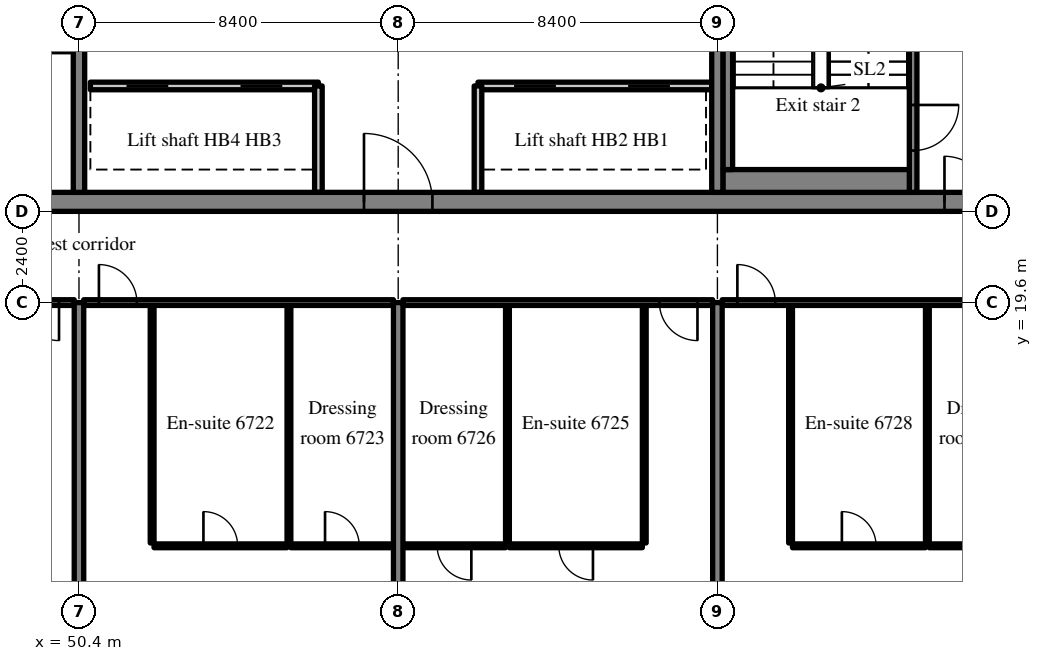
"""IFC4 building model, lengths in metres.
Left out: names, types, materials, properties, quantities, classifications, styles, units other than length and angle.
Written with IfcOpenShell. Run it as: python <this file> out.ifc"""

import sys

from ifc_helpers import new_model, si_unit, direction, frame, frame_2d, origin, place, context, subcontext, project, spatial, rectangle, extrude, source, transform, mapped, element, fill, save


model = new_model("IFC4")
c1 = context("Model", 3, precision=1e-05, world=origin(), true_north=direction((0.0, 1.0)))
c2 = subcontext(c1, "Body", "Model", "MODEL_VIEW")
j1 = project(units=[si_unit("LENGTHUNIT", "METRE"), si_unit("PLANEANGLEUNIT", "RADIAN")], contexts=[c1])
p1 = place(None, origin())
s1 = spatial("IfcSite", under=j1, at=p1, CompositionType="ELEMENT")
p2 = place(p1, origin())
s2 = spatial("IfcBuilding", under=s1, at=p2, CompositionType="ELEMENT")
p3 = place(p2, frame((0.0, 0.0, 281.7)))
s3 = spatial("IfcBuildingStorey", under=s2, at=p3, CompositionType="ELEMENT", Elevation=281.7)
m1 = source(origin(), c2, "Body", "SweptSolid", [
    extrude(rectangle(XDim=50.4, YDim=0.5, at=frame_2d((25.2, 0.0))), origin(), (0.0, 0.0, 1.0), 3.72),
])
p4 = place(p3, frame((25.2, 22.25, 0.0), z_axis=(0.0, 0.0, 1.0), x_axis=(1.0, 0.0, 0.0)))
e1 = element("IfcWall", 1, at=p4, inside=s3, PredefinedType="SHEAR", context=c2, shape_type="MappedRepresentation", body=[
    mapped(m1, transform((0.0, 0.0, 0.0), scale=1.0)),
])
m2 = source(origin(), c2, "Body", "SweptSolid", [
    extrude(rectangle(XDim=1.8, YDim=2.1, at=frame_2d((0.9, 1.05))), frame((0.0, 0.26, 0.0), z_axis=(0.0, -1.0, 0.0), x_axis=(1.0, 0.0, 0.0)), (0.0, 0.0, 1.0), 0.52),
])
p5 = place(p4, frame((15.9, 0.0, 0.0)))
e2 = element("IfcOpeningElement", 2, at=p5, cuts=e1, PredefinedType="OPENING", context=c2, shape_type="MappedRepresentation", body=[
    mapped(m2, transform((0.0, 0.0, 0.0), scale=1.0)),
])
m3 = source(origin(), c2, "Body", "SweptSolid", [
    extrude(rectangle(XDim=0.9, YDim=2.1, at=frame_2d((0.45, 1.05))), frame((0.0, 0.26, 0.0), z_axis=(0.0, -1.0, 0.0), x_axis=(1.0, 0.0, 0.0)), (0.0, 0.0, 1.0), 0.52),
])
p6 = place(p4, frame((21.525, 0.0, 0.0)))
e3 = element("IfcOpeningElement", 3, at=p6, cuts=e1, PredefinedType="OPENING", context=c2, shape_type="MappedRepresentation", body=[
    mapped(m3, transform((0.0, 0.0, 0.0), scale=1.0)),
])
p7 = place(p4, frame((32.7, 0.0, 0.0)))
e4 = element("IfcOpeningElement", 4, at=p7, cuts=e1, PredefinedType="OPENING", context=c2, shape_type="MappedRepresentation", body=[
    mapped(m2, transform((0.0, 0.0, 0.0), scale=1.0)),
])
m4 = source(origin(), c2, "Body", "SweptSolid", [
    extrude(rectangle(XDim=1.2, YDim=2.1, at=frame_2d((0.6, 1.05))), frame((0.0, 0.26, 0.0), z_axis=(0.0, -1.0, 0.0), x_axis=(1.0, 0.0, 0.0)), (0.0, 0.0, 1.0), 0.52),
])
p8 = place(p4, frame((6.5, 0.0, 0.0)))
e5 = element("IfcOpeningElement", 5, at=p8, cuts=e1, PredefinedType="OPENING", context=c2, shape_type="MappedRepresentation", body=[
    mapped(m4, transform((0.0, 0.0, 0.0), scale=1.0)),
])
p9 = place(p4, frame((47.975, 0.0, 0.0)))
e6 = element("IfcOpeningElement", 6, at=p9, cuts=e1, PredefinedType="OPENING", context=c2, shape_type="MappedRepresentation", body=[
    mapped(m4, transform((0.0, 0.0, 0.0), scale=1.0)),
])
m5 = source(origin(), c2, "Body", "SweptSolid", [
    extrude(rectangle(XDim=19.0, YDim=0.3, at=frame_2d((9.5, 0.0))), origin(), (0.0, 0.0, 1.0), 3.72),
])
p10 = place(p3, frame((50.4, 22.5, 0.0), z_axis=(0.0, 0.0, 1.0), x_axis=(0.0, 1.0, 0.0)))
e7 = element("IfcWall", 7, at=p10, inside=s3, PredefinedType="SHEAR", context=c2, shape_type="MappedRepresentation", body=[
    mapped(m5, transform((0.0, 0.0, 0.0), scale=1.0)),
])
m6 = source(origin(), c2, "Body", "SweptSolid", [
    extrude(rectangle(XDim=1.1, YDim=2.1, at=frame_2d((0.55, 1.05))), frame((0.0, 0.16, 0.0), z_axis=(0.0, -1.0, 0.0), x_axis=(1.0, 0.0, 0.0)), (0.0, 0.0, 1.0), 0.32),
])
p11 = place(p10, frame((12.95, 0.0, 0.0)))
e8 = element("IfcOpeningElement", 8, at=p11, cuts=e7, PredefinedType="OPENING", context=c2, shape_type="MappedRepresentation", body=[
    mapped(m6, transform((0.0, 0.0, 0.0), scale=1.0)),
])
p12 = place(p3, frame((67.2, 22.5, 0.0), z_axis=(0.0, 0.0, 1.0), x_axis=(0.0, 1.0, 0.0)))
e9 = element("IfcWall", 9, at=p12, inside=s3, PredefinedType="SHEAR", context=c2, shape_type="MappedRepresentation", body=[
    mapped(m5, transform((0.0, 0.0, 0.0), scale=1.0)),
])
m7 = source(origin(), c2, "Body", "SweptSolid", [
    extrude(rectangle(XDim=13.1, YDim=0.25, at=frame_2d((6.55, 0.0))), origin(), (0.0, 0.0, 1.0), 3.72),
])
p13 = place(p3, frame((50.4, 6.5, 0.0), z_axis=(0.0, 0.0, 1.0), x_axis=(0.0, 1.0, 0.0)))
e10 = element("IfcWall", 10, at=p13, inside=s3, PredefinedType="SHEAR", context=c2, shape_type="MappedRepresentation", body=[
    mapped(m7, transform((0.0, 0.0, 0.0), scale=1.0)),
])
m8 = source(origin(), c2, "Body", "SweptSolid", [
    extrude(rectangle(XDim=14.1, YDim=0.25, at=frame_2d((7.05, 0.0))), origin(), (0.0, 0.0, 1.0), 3.72),
])
for number, where, z_axis, x_axis in (
    (11, (58.8, 5.5, 0.0), (0.0, 0.0, 1.0), (0.0, 1.0, 0.0)),
    (12, (67.2, 5.5, 0.0), (0.0, 0.0, 1.0), (0.0, 1.0, 0.0)),
):
    element("IfcWall", number, at=place(p3, frame(where, z_axis=z_axis, x_axis=x_axis)), inside=s3, PredefinedType="SHEAR", context=c2, shape_type="MappedRepresentation", body=[
        mapped(m8, transform((0.0, 0.0, 0.0), scale=1.0)),
    ])
m9 = source(origin(), c2, "Body", "SweptSolid", [
    extrude(rectangle(XDim=6.15, YDim=0.2, at=frame_2d((3.075, 0.0))), origin(), (0.0, 0.0, 1.0), 3.72),
])
p14 = place(p3, frame((67.05, 25.3, 0.0), z_axis=(0.0, 0.0, 1.0), x_axis=(-1.0, 0.0, 0.0)))
e13 = element("IfcWall", 13, at=p14, inside=s3, PredefinedType="SOLIDWALL", context=c2, shape_type="MappedRepresentation", body=[
    mapped(m9, transform((0.0, 0.0, 0.0), scale=1.0)),
])
m10 = source(origin(), c2, "Body", "SweptSolid", [
    extrude(rectangle(XDim=1.1, YDim=2.1, at=frame_2d((0.55, 1.05))), frame((0.0, 0.11, 0.0), z_axis=(0.0, -1.0, 0.0), x_axis=(1.0, 0.0, 0.0)), (0.0, 0.0, 1.0), 0.22),
])
p15 = place(p14, frame((1.1, 0.0, 0.0)))
e14 = element("IfcOpeningElement", 14, at=p15, cuts=e13, PredefinedType="OPENING", context=c2, shape_type="MappedRepresentation", body=[
    mapped(m10, transform((0.0, 0.0, 0.0), scale=1.0)),
])
p16 = place(p14, frame((4.1, 0.0, 0.0)))
e15 = element("IfcOpeningElement", 15, at=p16, cuts=e13, PredefinedType="OPENING", context=c2, shape_type="MappedRepresentation", body=[
    mapped(m10, transform((0.0, 0.0, 0.0), scale=1.0)),
])
m11 = source(origin(), c2, "Body", "SweptSolid", [
    extrude(rectangle(XDim=6.0, YDim=0.2, at=frame_2d((3.0, 0.0))), origin(), (0.0, 0.0, 1.0), 3.72),
])
p17 = place(p3, frame((56.7, 25.3, 0.0), z_axis=(0.0, 0.0, 1.0), x_axis=(-1.0, 0.0, 0.0)))
e16 = element("IfcWall", 16, at=p17, inside=s3, PredefinedType="SOLIDWALL", context=c2, shape_type="MappedRepresentation", body=[
    mapped(m11, transform((0.0, 0.0, 0.0), scale=1.0)),
])
p18 = place(p17, frame((0.95, 0.0, 0.0)))
e17 = element("IfcOpeningElement", 17, at=p18, cuts=e16, PredefinedType="OPENING", context=c2, shape_type="MappedRepresentation", body=[
    mapped(m10, transform((0.0, 0.0, 0.0), scale=1.0)),
])
p19 = place(p17, frame((3.95, 0.0, 0.0)))
e18 = element("IfcOpeningElement", 18, at=p19, cuts=e16, PredefinedType="OPENING", context=c2, shape_type="MappedRepresentation", body=[
    mapped(m10, transform((0.0, 0.0, 0.0), scale=1.0)),
])
m12 = source(origin(), c2, "Body", "SweptSolid", [
    extrude(rectangle(XDim=2.8, YDim=0.2, at=frame_2d((1.4, 0.0))), origin(), (0.0, 0.0, 1.0), 3.72),
])
for number, where, z_axis, x_axis in (
    (19, (60.9, 22.5, 0.0), (0.0, 0.0, 1.0), (0.0, 1.0, 0.0)),
    (20, (56.7, 22.5, 0.0), (0.0, 0.0, 1.0), (0.0, 1.0, 0.0)),
):
    element("IfcWall", number, at=place(p3, frame(where, z_axis=z_axis, x_axis=x_axis)), inside=s3, PredefinedType="SOLIDWALL", context=c2, shape_type="MappedRepresentation", body=[
        mapped(m12, transform((0.0, 0.0, 0.0), scale=1.0)),
    ])
m13 = source(origin(), c2, "Body", "SweptSolid", [
    extrude(rectangle(XDim=8.95, YDim=0.2, at=frame_2d((4.475, 0.0))), origin(), (0.0, 0.0, 1.0), 3.72),
])
p20 = place(p3, frame((72.35, 22.5, 0.0), z_axis=(0.0, 0.0, 1.0), x_axis=(0.0, 1.0, 0.0)))
e21 = element("IfcWall", 21, at=p20, inside=s3, PredefinedType="SOLIDWALL", context=c2, shape_type="MappedRepresentation", body=[
    mapped(m13, transform((0.0, 0.0, 0.0), scale=1.0)),
])
m14 = source(origin(), c2, "Body", "SweptSolid", [
    extrude(rectangle(XDim=1.2, YDim=2.1, at=frame_2d((0.6, 1.05))), frame((0.0, 0.11, 0.0), z_axis=(0.0, -1.0, 0.0), x_axis=(1.0, 0.0, 0.0)), (0.0, 0.0, 1.0), 0.22),
])
p21 = place(p20, frame((1.1, 0.0, 0.0)))
e22 = element("IfcOpeningElement", 22, at=p21, cuts=e21, PredefinedType="OPENING", context=c2, shape_type="MappedRepresentation", body=[
    mapped(m14, transform((0.0, 0.0, 0.0), scale=1.0)),
])
m15 = source(origin(), c2, "Body", "SweptSolid", [
    extrude(rectangle(XDim=4.9, YDim=0.6, at=frame_2d((2.45, 0.0))), origin(), (0.0, 0.0, 1.0), 3.72),
])
p22 = place(p3, frame((67.35, 22.8, 0.0), z_axis=(0.0, 0.0, 1.0), x_axis=(1.0, 0.0, 0.0)))
e23 = element("IfcWall", 23, at=p22, inside=s3, PredefinedType="SOLIDWALL", context=c2, shape_type="MappedRepresentation", body=[
    mapped(m15, transform((0.0, 0.0, 0.0), scale=1.0)),
])
m16 = source(origin(), c2, "Body", "SweptSolid", [
    extrude(rectangle(XDim=8.1, YDim=0.25, at=frame_2d((4.05, 0.0))), origin(), (0.0, 0.0, 1.0), 3.72),
])
p23 = place(p3, frame((67.475, 23.1, 0.0), z_axis=(0.0, 0.0, 1.0), x_axis=(0.0, 1.0, 0.0)))
e24 = element("IfcWall", 24, at=p23, inside=s3, PredefinedType="SOLIDWALL", context=c2, shape_type="MappedRepresentation", body=[
    mapped(m16, transform((0.0, 0.0, 0.0), scale=1.0)),
])
m17 = source(origin(), c2, "Body", "SweptSolid", [
    extrude(rectangle(XDim=8.15, YDim=0.15, at=frame_2d((4.075, 0.0))), origin(), (0.0, 0.0, 1.0), 3.02),
])
p24 = place(p3, frame((42.125, 19.6, 0.0), z_axis=(0.0, 0.0, 1.0), x_axis=(1.0, 0.0, 0.0)))
e25 = element("IfcWall", 25, at=p24, inside=s3, PredefinedType="PARTITIONING", context=c2, shape_type="MappedRepresentation", body=[
    mapped(m17, transform((0.0, 0.0, 0.0), scale=1.0)),
])
m18 = source(origin(), c2, "Body", "SweptSolid", [
    extrude(rectangle(XDim=1.0, YDim=2.1, at=frame_2d((0.5, 1.05))), frame((0.0, 0.085, 0.0), z_axis=(0.0, -1.0, 0.0), x_axis=(1.0, 0.0, 0.0)), (0.0, 0.0, 1.0), 0.17),
])
p25 = place(p24, frame((6.75, 0.0, 0.0)))
e26 = element("IfcOpeningElement", 26, at=p25, cuts=e25, PredefinedType="OPENING", context=c2, shape_type="MappedRepresentation", body=[
    mapped(m18, transform((0.0, 0.0, 0.0), scale=1.0)),
])
m19 = source(origin(), c2, "Body", "SweptSolid", [
    extrude(rectangle(XDim=6.25, YDim=0.1, at=frame_2d((3.125, 0.0))), origin(), (0.0, 0.0, 1.0), 3.72),
])
for number, where, z_axis, x_axis in (
    (27, (52.325, 13.275, 0.0), (0.0, 0.0, 1.0), (0.0, 1.0, 0.0)),
    (28, (55.925, 13.275, 0.0), (0.0, 0.0, 1.0), (0.0, 1.0, 0.0)),
):
    element("IfcWall", number, at=place(p3, frame(where, z_axis=z_axis, x_axis=x_axis)), inside=s3, PredefinedType="PARTITIONING", context=c2, shape_type="MappedRepresentation", body=[
        mapped(m19, transform((0.0, 0.0, 0.0), scale=1.0)),
    ])
m20 = source(origin(), c2, "Body", "SweptSolid", [
    extrude(rectangle(XDim=3.5, YDim=0.1, at=frame_2d((1.75, 0.0))), origin(), (0.0, 0.0, 1.0), 3.72),
])
p26 = place(p3, frame((52.375, 13.2, 0.0), z_axis=(0.0, 0.0, 1.0), x_axis=(1.0, 0.0, 0.0)))
e29 = element("IfcWall", 29, at=p26, inside=s3, PredefinedType="PARTITIONING", context=c2, shape_type="MappedRepresentation", body=[
    mapped(m20, transform((0.0, 0.0, 0.0), scale=1.0)),
])
m21 = source(origin(), c2, "Body", "SweptSolid", [
    extrude(rectangle(XDim=0.9, YDim=2.1, at=frame_2d((0.45, 1.05))), frame((0.0, 0.06, 0.0), z_axis=(0.0, -1.0, 0.0), x_axis=(1.0, 0.0, 0.0)), (0.0, 0.0, 1.0), 0.12),
])
p27 = place(p26, frame((1.3, 0.0, 0.0)))
e30 = element("IfcOpeningElement", 30, at=p27, cuts=e29, PredefinedType="OPENING", context=c2, shape_type="MappedRepresentation", body=[
    mapped(m21, transform((0.0, 0.0, 0.0), scale=1.0)),
])
m22 = source(origin(), c2, "Body", "SweptSolid", [
    extrude(rectangle(XDim=2.7, YDim=0.1, at=frame_2d((1.35, 0.0))), origin(), (0.0, 0.0, 1.0), 3.72),
])
p28 = place(p3, frame((55.975, 13.2, 0.0), z_axis=(0.0, 0.0, 1.0), x_axis=(1.0, 0.0, 0.0)))
e31 = element("IfcWall", 31, at=p28, inside=s3, PredefinedType="PARTITIONING", context=c2, shape_type="MappedRepresentation", body=[
    mapped(m22, transform((0.0, 0.0, 0.0), scale=1.0)),
])
p29 = place(p28, frame((0.9, 0.0, 0.0)))
e32 = element("IfcOpeningElement", 32, at=p29, cuts=e31, PredefinedType="OPENING", context=c2, shape_type="MappedRepresentation", body=[
    mapped(m21, transform((0.0, 0.0, 0.0), scale=1.0)),
])
m23 = source(origin(), c2, "Body", "SweptSolid", [
    extrude(rectangle(XDim=8.15, YDim=0.15, at=frame_2d((4.075, 0.0))), origin(), (0.0, 0.0, 1.0), 3.02),
])
p30 = place(p3, frame((50.525, 19.6, 0.0), z_axis=(0.0, 0.0, 1.0), x_axis=(1.0, 0.0, 0.0)))
e33 = element("IfcWall", 33, at=p30, inside=s3, PredefinedType="PARTITIONING", context=c2, shape_type="MappedRepresentation", body=[
    mapped(m23, transform((0.0, 0.0, 0.0), scale=1.0)),
])
p31 = place(p30, frame((0.4, 0.0, 0.0)))
e34 = element("IfcOpeningElement", 34, at=p31, cuts=e33, PredefinedType="OPENING", context=c2, shape_type="MappedRepresentation", body=[
    mapped(m18, transform((0.0, 0.0, 0.0), scale=1.0)),
])
for number, where, z_axis, x_axis in (
    (35, (65.275, 13.275, 0.0), (0.0, 0.0, 1.0), (0.0, 1.0, 0.0)),
    (36, (61.675, 13.275, 0.0), (0.0, 0.0, 1.0), (0.0, 1.0, 0.0)),
):
    element("IfcWall", number, at=place(p3, frame(where, z_axis=z_axis, x_axis=x_axis)), inside=s3, PredefinedType="PARTITIONING", context=c2, shape_type="MappedRepresentation", body=[
        mapped(m19, transform((0.0, 0.0, 0.0), scale=1.0)),
    ])
p32 = place(p3, frame((61.725, 13.2, 0.0), z_axis=(0.0, 0.0, 1.0), x_axis=(1.0, 0.0, 0.0)))
e37 = element("IfcWall", 37, at=p32, inside=s3, PredefinedType="PARTITIONING", context=c2, shape_type="MappedRepresentation", body=[
    mapped(m20, transform((0.0, 0.0, 0.0), scale=1.0)),
])
p33 = place(p32, frame((1.3, 0.0, 0.0)))
e38 = element("IfcOpeningElement", 38, at=p33, cuts=e37, PredefinedType="OPENING", context=c2, shape_type="MappedRepresentation", body=[
    mapped(m21, transform((0.0, 0.0, 0.0), scale=1.0)),
])
p34 = place(p3, frame((58.925, 13.2, 0.0), z_axis=(0.0, 0.0, 1.0), x_axis=(1.0, 0.0, 0.0)))
e39 = element("IfcWall", 39, at=p34, inside=s3, PredefinedType="PARTITIONING", context=c2, shape_type="MappedRepresentation", body=[
    mapped(m22, transform((0.0, 0.0, 0.0), scale=1.0)),
])
p35 = place(p34, frame((0.9, 0.0, 0.0)))
e40 = element("IfcOpeningElement", 40, at=p35, cuts=e39, PredefinedType="OPENING", context=c2, shape_type="MappedRepresentation", body=[
    mapped(m21, transform((0.0, 0.0, 0.0), scale=1.0)),
])
p36 = place(p3, frame((58.925, 19.6, 0.0), z_axis=(0.0, 0.0, 1.0), x_axis=(1.0, 0.0, 0.0)))
e41 = element("IfcWall", 41, at=p36, inside=s3, PredefinedType="PARTITIONING", context=c2, shape_type="MappedRepresentation", body=[
    mapped(m17, transform((0.0, 0.0, 0.0), scale=1.0)),
])
p37 = place(p36, frame((6.75, 0.0, 0.0)))
e42 = element("IfcOpeningElement", 42, at=p37, cuts=e41, PredefinedType="OPENING", context=c2, shape_type="MappedRepresentation", body=[
    mapped(m18, transform((0.0, 0.0, 0.0), scale=1.0)),
])
for number, where, z_axis, x_axis in (
    (43, (69.125, 13.275, 0.0), (0.0, 0.0, 1.0), (0.0, 1.0, 0.0)),
    (44, (72.725, 13.275, 0.0), (0.0, 0.0, 1.0), (0.0, 1.0, 0.0)),
):
    element("IfcWall", number, at=place(p3, frame(where, z_axis=z_axis, x_axis=x_axis)), inside=s3, PredefinedType="PARTITIONING", context=c2, shape_type="MappedRepresentation", body=[
        mapped(m19, transform((0.0, 0.0, 0.0), scale=1.0)),
    ])
p38 = place(p3, frame((69.175, 13.2, 0.0), z_axis=(0.0, 0.0, 1.0), x_axis=(1.0, 0.0, 0.0)))
e45 = element("IfcWall", 45, at=p38, inside=s3, PredefinedType="PARTITIONING", context=c2, shape_type="MappedRepresentation", body=[
    mapped(m20, transform((0.0, 0.0, 0.0), scale=1.0)),
])
p39 = place(p38, frame((1.3, 0.0, 0.0)))
e46 = element("IfcOpeningElement", 46, at=p39, cuts=e45, PredefinedType="OPENING", context=c2, shape_type="MappedRepresentation", body=[
    mapped(m21, transform((0.0, 0.0, 0.0), scale=1.0)),
])
m24 = source(origin(), c2, "Body", "SweptSolid", [
    extrude(rectangle(XDim=2.7, YDim=0.1, at=frame_2d((1.35, 0.0))), origin(), (0.0, 0.0, 1.0), 3.72),
])
p40 = place(p3, frame((72.775, 13.2, 0.0), z_axis=(0.0, 0.0, 1.0), x_axis=(1.0, 0.0, 0.0)))
e47 = element("IfcWall", 47, at=p40, inside=s3, PredefinedType="PARTITIONING", context=c2, shape_type="MappedRepresentation", body=[
    mapped(m24, transform((0.0, 0.0, 0.0), scale=1.0)),
])
p41 = place(p40, frame((0.9, 0.0, 0.0)))
e48 = element("IfcOpeningElement", 48, at=p41, cuts=e47, PredefinedType="OPENING", context=c2, shape_type="MappedRepresentation", body=[
    mapped(m21, transform((0.0, 0.0, 0.0), scale=1.0)),
])
p42 = place(p3, frame((67.325, 19.6, 0.0), z_axis=(0.0, 0.0, 1.0), x_axis=(1.0, 0.0, 0.0)))
e49 = element("IfcWall", 49, at=p42, inside=s3, PredefinedType="PARTITIONING", context=c2, shape_type="MappedRepresentation", body=[
    mapped(m23, transform((0.0, 0.0, 0.0), scale=1.0)),
])
p43 = place(p42, frame((0.4, 0.0, 0.0)))
e50 = element("IfcOpeningElement", 50, at=p43, cuts=e49, PredefinedType="OPENING", context=c2, shape_type="MappedRepresentation", body=[
    mapped(m18, transform((0.0, 0.0, 0.0), scale=1.0)),
])
m25 = source(origin(), c2, "Body", "SweptSolid", [
    extrude(rectangle(XDim=1.8, YDim=2.1, at=frame_2d((0.9, 1.05))), frame((0.0, 0.175, 0.0), z_axis=(0.0, -1.0, 0.0), x_axis=(1.0, 0.0, 0.0)), (0.0, 0.0, 1.0), 0.05),
])
p44 = place(p7, origin())
e51 = element("IfcDoor", 51, at=p44, inside=s3, OperationType="DOUBLE_DOOR_SINGLE_SWING", PredefinedType="DOOR", context=c2, shape_type="MappedRepresentation", body=[
    mapped(m25, transform((0.0, 0.0, 0.0), scale=1.0)),
])
fill(e4, e51)
m26 = source(origin(), c2, "Body", "SweptSolid", [
    extrude(rectangle(XDim=1.1, YDim=2.1, at=frame_2d((0.55, 1.05))), frame((0.0, 0.025, 0.0), z_axis=(0.0, -1.0, 0.0), x_axis=(1.0, 0.0, 0.0)), (0.0, 0.0, 1.0), 0.05),
])
p45 = place(p15, origin())
e52 = element("IfcDoor", 52, at=p45, inside=s3, OperationType="SLIDING_TO_RIGHT", PredefinedType="DOOR", context=c2, shape_type="MappedRepresentation", body=[
    mapped(m26, transform((0.0, 0.0, 0.0), scale=1.0)),
])
fill(e14, e52)
p46 = place(p16, origin())
e53 = element("IfcDoor", 53, at=p46, inside=s3, OperationType="SLIDING_TO_LEFT", PredefinedType="DOOR", context=c2, shape_type="MappedRepresentation", body=[
    mapped(m26, transform((0.0, 0.0, 0.0), scale=1.0)),
])
fill(e15, e53)
p47 = place(p18, origin())
e54 = element("IfcDoor", 54, at=p47, inside=s3, OperationType="SLIDING_TO_RIGHT", PredefinedType="DOOR", context=c2, shape_type="MappedRepresentation", body=[
    mapped(m26, transform((0.0, 0.0, 0.0), scale=1.0)),
])
fill(e17, e54)
p48 = place(p19, origin())
e55 = element("IfcDoor", 55, at=p48, inside=s3, OperationType="SLIDING_TO_LEFT", PredefinedType="DOOR", context=c2, shape_type="MappedRepresentation", body=[
    mapped(m26, transform((0.0, 0.0, 0.0), scale=1.0)),
])
fill(e18, e55)
m27 = source(origin(), c2, "Body", "SweptSolid", [
    extrude(rectangle(XDim=1.2, YDim=2.1, at=frame_2d((0.6, 1.05))), frame((0.0, 0.025, 0.0), z_axis=(0.0, -1.0, 0.0), x_axis=(1.0, 0.0, 0.0)), (0.0, 0.0, 1.0), 0.05),
])
p49 = place(p21, origin())
e56 = element("IfcDoor", 56, at=p49, inside=s3, OperationType="SINGLE_SWING_RIGHT", PredefinedType="DOOR", context=c2, shape_type="MappedRepresentation", body=[
    mapped(m27, transform((0.0, 0.0, 0.0), scale=1.0)),
])
fill(e22, e56)
m28 = source(origin(), c2, "Body", "SweptSolid", [
    extrude(rectangle(XDim=1.2, YDim=2.1, at=frame_2d((0.6, 1.05))), frame((0.0, 0.175, 0.0), z_axis=(0.0, -1.0, 0.0), x_axis=(1.0, 0.0, 0.0)), (0.0, 0.0, 1.0), 0.05),
])
p50 = place(p9, origin())
e57 = element("IfcDoor", 57, at=p50, inside=s3, OperationType="SINGLE_SWING_LEFT", PredefinedType="DOOR", context=c2, shape_type="MappedRepresentation", body=[
    mapped(m28, transform((0.0, 0.0, 0.0), scale=1.0)),
])
fill(e6, e57)
m29 = source(origin(), c2, "Body", "SweptSolid", [
    extrude(rectangle(XDim=1.0, YDim=2.1, at=frame_2d((0.5, 1.05))), frame((0.0, 0.025, 0.0), z_axis=(0.0, -1.0, 0.0), x_axis=(1.0, 0.0, 0.0)), (0.0, 0.0, 1.0), 0.05),
])
p51 = place(p25, origin())
e58 = element("IfcDoor", 58, at=p51, inside=s3, OperationType="SINGLE_SWING_RIGHT", PredefinedType="DOOR", context=c2, shape_type="MappedRepresentation", body=[
    mapped(m29, transform((0.0, 0.0, 0.0), scale=1.0)),
])
fill(e26, e58)
m30 = source(origin(), c2, "Body", "SweptSolid", [
    extrude(rectangle(XDim=0.9, YDim=2.1, at=frame_2d((0.45, 1.05))), frame((0.0, 0.025, 0.0), z_axis=(0.0, -1.0, 0.0), x_axis=(1.0, 0.0, 0.0)), (0.0, 0.0, 1.0), 0.05),
])
p52 = place(p27, origin())
e59 = element("IfcDoor", 59, at=p52, inside=s3, OperationType="SINGLE_SWING_LEFT", PredefinedType="DOOR", context=c2, shape_type="MappedRepresentation", body=[
    mapped(m30, transform((0.0, 0.0, 0.0), scale=1.0)),
])
fill(e30, e59)
p53 = place(p29, origin())
e60 = element("IfcDoor", 60, at=p53, inside=s3, OperationType="SINGLE_SWING_LEFT", PredefinedType="DOOR", context=c2, shape_type="MappedRepresentation", body=[
    mapped(m30, transform((0.0, 0.0, 0.0), scale=1.0)),
])
fill(e32, e60)
p54 = place(p31, origin())
e61 = element("IfcDoor", 61, at=p54, inside=s3, OperationType="SINGLE_SWING_LEFT", PredefinedType="DOOR", context=c2, shape_type="MappedRepresentation", body=[
    mapped(m29, transform((0.0, 0.0, 0.0), scale=1.0)),
])
fill(e34, e61)
p55 = place(p33, origin())
e62 = element("IfcDoor", 62, at=p55, inside=s3, OperationType="SINGLE_SWING_RIGHT", PredefinedType="DOOR", context=c2, shape_type="MappedRepresentation", body=[
    mapped(m30, transform((0.0, 0.0, 0.0), scale=1.0)),
])
fill(e38, e62)
p56 = place(p35, origin())
e63 = element("IfcDoor", 63, at=p56, inside=s3, OperationType="SINGLE_SWING_RIGHT", PredefinedType="DOOR", context=c2, shape_type="MappedRepresentation", body=[
    mapped(m30, transform((0.0, 0.0, 0.0), scale=1.0)),
])
fill(e40, e63)
p57 = place(p37, origin())
e64 = element("IfcDoor", 64, at=p57, inside=s3, OperationType="SINGLE_SWING_RIGHT", PredefinedType="DOOR", context=c2, shape_type="MappedRepresentation", body=[
    mapped(m29, transform((0.0, 0.0, 0.0), scale=1.0)),
])
fill(e42, e64)
p58 = place(p39, origin())
e65 = element("IfcDoor", 65, at=p58, inside=s3, OperationType="SINGLE_SWING_LEFT", PredefinedType="DOOR", context=c2, shape_type="MappedRepresentation", body=[
    mapped(m30, transform((0.0, 0.0, 0.0), scale=1.0)),
])
fill(e46, e65)
p59 = place(p43, origin())
e66 = element("IfcDoor", 66, at=p59, inside=s3, OperationType="SINGLE_SWING_LEFT", PredefinedType="DOOR", context=c2, shape_type="MappedRepresentation", body=[
    mapped(m29, transform((0.0, 0.0, 0.0), scale=1.0)),
])
fill(e50, e66)
save(model, sys.argv[1])
